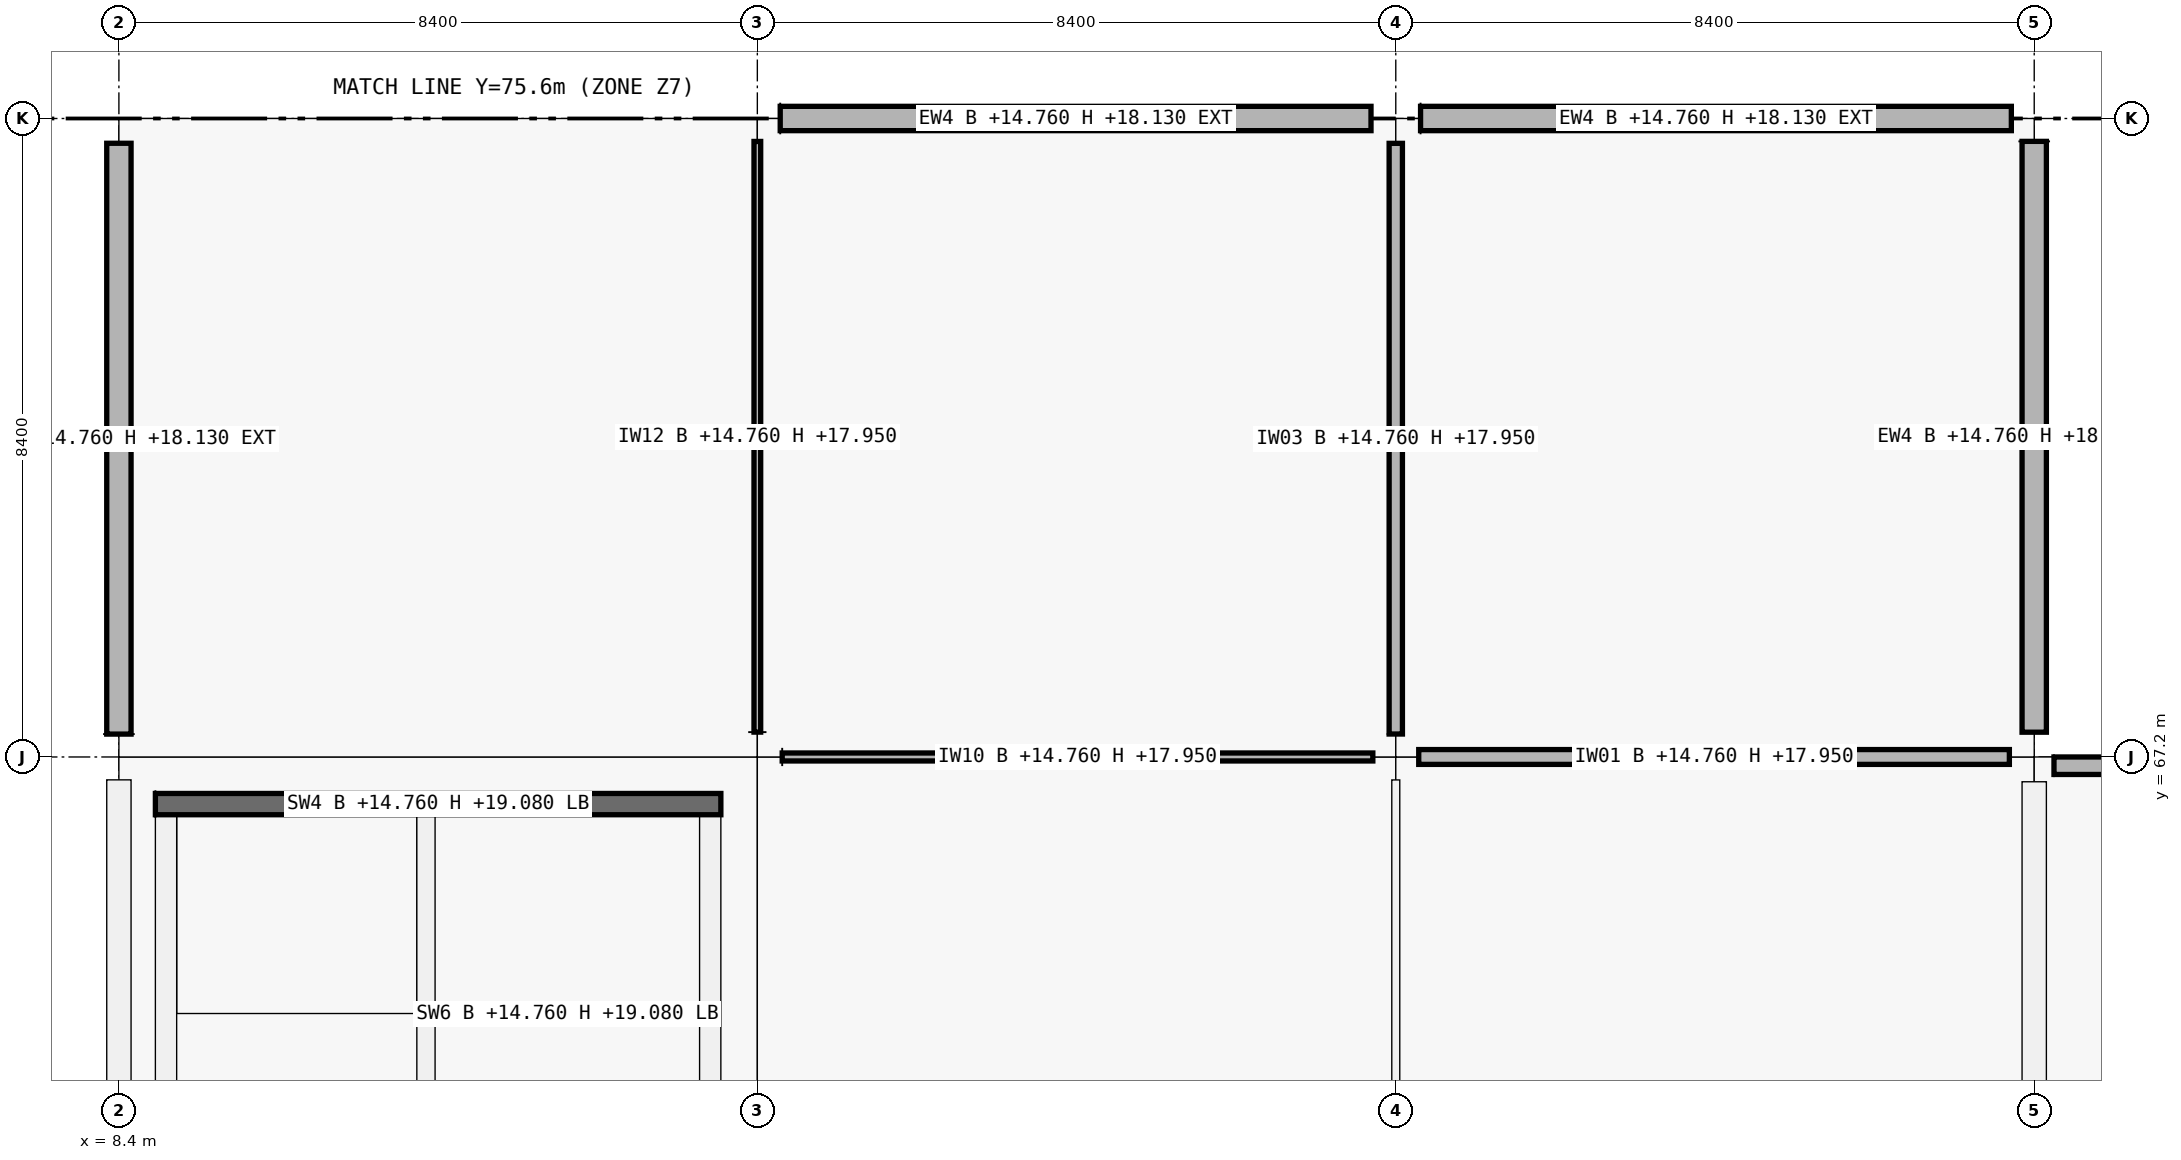
"""IFC4 building model, lengths in metres.
Left out: names, types, materials, properties, quantities, classifications, styles, units other than length and angle.
Written with IfcOpenShell. Run it as: python <this file> out.ifc"""

import sys

from ifc_helpers import new_model, si_unit, direction, frame, frame_2d, origin, origin_2d, place, context, subcontext, project, spatial, rectangle, extrude, element, fill, save


model = new_model("IFC4")
c1 = context("Model", 3, precision=1e-05, world=origin(), true_north=direction((0.0, 1.0)))
c2 = subcontext(c1, "Body", "Model", "MODEL_VIEW")
j1 = project(units=[si_unit("LENGTHUNIT", "METRE"), si_unit("PLANEANGLEUNIT", "RADIAN")], contexts=[c1])
p1 = place(None, origin())
s1 = spatial("IfcSite", under=j1, at=p1, CompositionType="ELEMENT")
p2 = place(p1, origin())
s2 = spatial("IfcBuilding", under=s1, at=p2, CompositionType="ELEMENT")
p3 = place(p2, frame((0.0, 0.0, 14.76)))
s3 = spatial("IfcBuildingStorey", under=s2, at=p3, CompositionType="ELEMENT", Elevation=14.76)
p4 = place(p3, frame((8.4, 67.2, 0.0), z_axis=(0.0, 0.0, 1.0), x_axis=(1.0, 0.0, 0.0)))
e1 = element("IfcColumn", 1, at=p4, inside=s3, PredefinedType="COLUMN", context=c2, shape_type="SweptSolid", body=[
    extrude(rectangle(XDim=0.6, YDim=0.6, at=origin_2d()), origin(), (0.0, 0.0, 1.0), 4.32),
])
for number, where, z_axis, x_axis in (
    (2, (8.4, 75.6, 0.0), (0.0, 0.0, 1.0), (1.0, 0.0, 0.0)),
    (3, (16.8, 67.2, 0.0), (0.0, 0.0, 1.0), (1.0, 0.0, 0.0)),
):
    element("IfcColumn", number, at=place(p3, frame(where, z_axis=z_axis, x_axis=x_axis)), inside=s3, PredefinedType="COLUMN", context=c2, shape_type="SweptSolid", body=[
        extrude(rectangle(XDim=0.65, YDim=0.65, at=origin_2d()), origin(), (0.0, 0.0, 1.0), 4.32),
    ])
for number, where, z_axis, x_axis in (
    (4, (16.8, 75.6, 0.0), (0.0, 0.0, 1.0), (1.0, 0.0, 0.0)),
    (5, (25.2, 67.2, 0.0), (0.0, 0.0, 1.0), (1.0, 0.0, 0.0)),
):
    element("IfcColumn", number, at=place(p3, frame(where, z_axis=z_axis, x_axis=x_axis)), inside=s3, PredefinedType="COLUMN", context=c2, shape_type="SweptSolid", body=[
        extrude(rectangle(XDim=0.6, YDim=0.6, at=origin_2d()), origin(), (0.0, 0.0, 1.0), 4.32),
    ])
for number, where, z_axis, x_axis in (
    (6, (25.2, 75.6, 0.0), (0.0, 0.0, 1.0), (1.0, 0.0, 0.0)),
    (7, (33.6, 67.2, 0.0), (0.0, 0.0, 1.0), (1.0, 0.0, 0.0)),
):
    element("IfcColumn", number, at=place(p3, frame(where, z_axis=z_axis, x_axis=x_axis)), inside=s3, PredefinedType="COLUMN", context=c2, shape_type="SweptSolid", body=[
        extrude(rectangle(XDim=0.65, YDim=0.65, at=origin_2d()), origin(), (0.0, 0.0, 1.0), 4.32),
    ])
p5 = place(p3, frame((33.6, 75.6, 0.0), z_axis=(0.0, 0.0, 1.0), x_axis=(1.0, 0.0, 0.0)))
e8 = element("IfcColumn", 8, at=p5, inside=s3, PredefinedType="COLUMN", context=c2, shape_type="SweptSolid", body=[
    extrude(rectangle(XDim=0.6, YDim=0.6, at=origin_2d()), origin(), (0.0, 0.0, 1.0), 4.32),
])
p6 = place(p3, frame((8.4, 59.126, 0.0), z_axis=(0.0, 0.0, 1.0), x_axis=(0.0, 1.0, 0.0)))
e9 = element("IfcWall", 9, at=p6, inside=s3, PredefinedType="SOLIDWALL", context=c2, shape_type="SweptSolid", body=[
    extrude(rectangle(XDim=7.773, YDim=0.32, at=frame_2d((3.886, 0.0))), origin(), (0.0, 0.0, 1.0), 3.37),
])
p7 = place(p3, frame((8.4, 67.501, 0.0), z_axis=(0.0, 0.0, 1.0), x_axis=(0.0, 1.0, 0.0)))
e10 = element("IfcWall", 10, at=p7, inside=s3, PredefinedType="SOLIDWALL", context=c2, shape_type="SweptSolid", body=[
    extrude(rectangle(XDim=7.773, YDim=0.32, at=frame_2d((3.886, 0.0))), origin(), (0.0, 0.0, 1.0), 3.37),
])
p8 = place(p7, frame((2.786, 0.0, 0.9)))
e11 = element("IfcOpeningElement", 11, at=p8, cuts=e10, PredefinedType="OPENING", context=c2, shape_type="SweptSolid", body=[
    extrude(rectangle(XDim=2.2, YDim=1.35, at=frame_2d((1.1, 0.675))), frame((0.0, 0.16, 0.0), z_axis=(0.0, -1.0, 0.0), x_axis=(1.0, 0.0, 0.0)), (0.0, 0.0, 1.0), 0.32),
])
p9 = place(p3, frame((17.101, 75.6, 0.0), z_axis=(0.0, 0.0, 1.0), x_axis=(1.0, 0.0, 0.0)))
e12 = element("IfcWall", 12, at=p9, inside=s3, PredefinedType="SOLIDWALL", context=c2, shape_type="SweptSolid", body=[
    extrude(rectangle(XDim=7.773, YDim=0.32, at=frame_2d((3.886, 0.0))), origin(), (0.0, 0.0, 1.0), 3.37),
])
p10 = place(p9, frame((2.986, 0.0, 0.9)))
e13 = element("IfcOpeningElement", 13, at=p10, cuts=e12, PredefinedType="OPENING", context=c2, shape_type="SweptSolid", body=[
    extrude(rectangle(XDim=1.8, YDim=1.35, at=frame_2d((0.9, 0.675))), frame((0.0, 0.16, 0.0), z_axis=(0.0, -1.0, 0.0), x_axis=(1.0, 0.0, 0.0)), (0.0, 0.0, 1.0), 0.32),
])
p11 = place(p3, frame((33.6, 66.874, 0.0), z_axis=(0.0, 0.0, 1.0), x_axis=(0.0, -1.0, 0.0)))
e14 = element("IfcWall", 14, at=p11, inside=s3, PredefinedType="SOLIDWALL", context=c2, shape_type="SweptSolid", body=[
    extrude(rectangle(XDim=7.773, YDim=0.32, at=frame_2d((3.886, 0.0))), origin(), (0.0, 0.0, 1.0), 3.37),
])
p12 = place(p11, frame((2.286, 0.0, 0.9)))
e15 = element("IfcOpeningElement", 15, at=p12, cuts=e14, PredefinedType="OPENING", context=c2, shape_type="SweptSolid", body=[
    extrude(rectangle(XDim=3.2, YDim=1.75, at=frame_2d((1.6, 0.875))), frame((0.0, 0.16, 0.0), z_axis=(0.0, -1.0, 0.0), x_axis=(1.0, 0.0, 0.0)), (0.0, 0.0, 1.0), 0.32),
])
p13 = place(p3, frame((25.526, 75.6, 0.0), z_axis=(0.0, 0.0, 1.0), x_axis=(1.0, 0.0, 0.0)))
e16 = element("IfcWall", 16, at=p13, inside=s3, PredefinedType="SOLIDWALL", context=c2, shape_type="SweptSolid", body=[
    extrude(rectangle(XDim=7.773, YDim=0.32, at=frame_2d((3.887, 0.0))), origin(), (0.0, 0.0, 1.0), 3.37),
])
p14 = place(p13, frame((2.636, 0.0, 0.9)))
e17 = element("IfcOpeningElement", 17, at=p14, cuts=e16, PredefinedType="OPENING", context=c2, shape_type="SweptSolid", body=[
    extrude(rectangle(XDim=2.5, YDim=1.65, at=frame_2d((1.25, 0.825))), frame((0.0, 0.16, 0.0), z_axis=(0.0, -1.0, 0.0), x_axis=(1.0, 0.0, 0.0)), (0.0, 0.0, 1.0), 0.32),
])
p15 = place(p3, frame((33.6, 75.299, 0.0), z_axis=(0.0, 0.0, 1.0), x_axis=(0.0, -1.0, 0.0)))
e18 = element("IfcWall", 18, at=p15, inside=s3, PredefinedType="SOLIDWALL", context=c2, shape_type="SweptSolid", body=[
    extrude(rectangle(XDim=7.773, YDim=0.32, at=frame_2d((3.887, 0.0))), origin(), (0.0, 0.0, 1.0), 3.37),
])
p16 = place(p3, frame((33.86, 67.085, 0.0), z_axis=(0.0, 0.0, 1.0), x_axis=(1.0, 0.0, 0.0)))
e19 = element("IfcWall", 19, at=p16, inside=s3, PredefinedType="PARAPET", context=c2, shape_type="SweptSolid", body=[
    extrude(rectangle(XDim=7.88, YDim=0.23, at=frame_2d((3.94, 0.0))), origin(), (0.0, 0.0, 1.0), 0.95),
])
p17 = place(p3, frame((9.02, 59.56, 0.0), z_axis=(0.0, 0.0, 1.0), x_axis=(0.0, 1.0, 0.0)))
e20 = element("IfcWall", 20, at=p17, inside=s3, PredefinedType="SHEAR", context=c2, shape_type="SweptSolid", body=[
    extrude(rectangle(XDim=6.88, YDim=0.28, at=frame_2d((3.44, 0.0))), origin(), (0.0, 0.0, 1.0), 4.32),
])
p18 = place(p3, frame((8.88, 66.58, 0.0), z_axis=(0.0, 0.0, 1.0), x_axis=(1.0, 0.0, 0.0)))
e21 = element("IfcWall", 21, at=p18, inside=s3, PredefinedType="SHEAR", context=c2, shape_type="SweptSolid", body=[
    extrude(rectangle(XDim=7.44, YDim=0.28, at=frame_2d((3.72, 0.0))), origin(), (0.0, 0.0, 1.0), 4.32),
])
p19 = place(p3, frame((16.18, 66.44, 0.0), z_axis=(0.0, 0.0, 1.0), x_axis=(0.0, -1.0, 0.0)))
e22 = element("IfcWall", 22, at=p19, inside=s3, PredefinedType="SHEAR", context=c2, shape_type="SweptSolid", body=[
    extrude(rectangle(XDim=6.88, YDim=0.28, at=frame_2d((3.44, 0.0))), origin(), (0.0, 0.0, 1.0), 4.32),
])
p20 = place(p3, frame((12.44, 59.56, 0.0), z_axis=(0.0, 0.0, 1.0), x_axis=(0.0, 1.0, 0.0)))
e23 = element("IfcWall", 23, at=p20, inside=s3, PredefinedType="SHEAR", context=c2, shape_type="SweptSolid", body=[
    extrude(rectangle(XDim=6.88, YDim=0.24, at=frame_2d((3.44, 0.0))), origin(), (0.0, 0.0, 1.0), 4.32),
])
p21 = place(p20, frame((0.12, 0.0, 0.0)))
e24 = element("IfcOpeningElement", 24, at=p21, cuts=e23, PredefinedType="OPENING", context=c2, shape_type="SweptSolid", body=[
    extrude(rectangle(XDim=1.0, YDim=2.15, at=frame_2d((0.5, 1.075))), frame((0.0, 0.12, 0.0), z_axis=(0.0, -1.0, 0.0), x_axis=(1.0, 0.0, 0.0)), (0.0, 0.0, 1.0), 0.24),
])
p22 = place(p3, frame((12.56, 63.82, 0.0), z_axis=(0.0, 0.0, 1.0), x_axis=(1.0, 0.0, 0.0)))
e25 = element("IfcWall", 25, at=p22, inside=s3, PredefinedType="SHEAR", context=c2, shape_type="SweptSolid", body=[
    extrude(rectangle(XDim=3.48, YDim=0.24, at=frame_2d((1.74, 0.0))), origin(), (0.0, 0.0, 1.0), 4.32),
])
p23 = place(p22, frame((1.19, 0.0, 0.0)))
e26 = element("IfcOpeningElement", 26, at=p23, cuts=e25, PredefinedType="OPENING", context=c2, shape_type="SweptSolid", body=[
    extrude(rectangle(XDim=1.1, YDim=2.15, at=frame_2d((0.55, 1.075))), frame((0.0, 0.12, 0.0), z_axis=(0.0, -1.0, 0.0), x_axis=(1.0, 0.0, 0.0)), (0.0, 0.0, 1.0), 0.24),
])
p24 = place(p3, frame((17.127, 67.2, 0.0), z_axis=(0.0, 0.0, 1.0), x_axis=(1.0, 0.0, 0.0)))
e27 = element("IfcWall", 27, at=p24, inside=s3, PredefinedType="PARTITIONING", context=c2, shape_type="SweptSolid", body=[
    extrude(rectangle(XDim=7.771, YDim=0.105, at=frame_2d((3.885, 0.0))), origin(), (0.0, 0.0, 1.0), 3.19),
])
p25 = place(p24, frame((3.356, 0.0, 0.0)))
e28 = element("IfcOpeningElement", 28, at=p25, cuts=e27, PredefinedType="OPENING", context=c2, shape_type="SweptSolid", body=[
    extrude(rectangle(XDim=1.06, YDim=2.25, at=frame_2d((0.53, 1.125))), frame((0.0, 0.052, 0.0), z_axis=(0.0, -1.0, 0.0), x_axis=(1.0, 0.0, 0.0)), (0.0, 0.0, 1.0), 0.105),
])
p26 = place(p3, frame((25.502, 67.2, 0.0), z_axis=(0.0, 0.0, 1.0), x_axis=(1.0, 0.0, 0.0)))
e29 = element("IfcWall", 29, at=p26, inside=s3, PredefinedType="PARTITIONING", context=c2, shape_type="SweptSolid", body=[
    extrude(rectangle(XDim=7.771, YDim=0.195, at=frame_2d((3.885, 0.0))), origin(), (0.0, 0.0, 1.0), 3.19),
])
p27 = place(p26, frame((3.401, 0.0, 0.0)))
e30 = element("IfcOpeningElement", 30, at=p27, cuts=e29, PredefinedType="OPENING", context=c2, shape_type="SweptSolid", body=[
    extrude(rectangle(XDim=0.97, YDim=2.12, at=frame_2d((0.485, 1.06))), frame((0.0, 0.098, 0.0), z_axis=(0.0, -1.0, 0.0), x_axis=(1.0, 0.0, 0.0)), (0.0, 0.0, 1.0), 0.195),
])
p28 = place(p3, frame((16.8, 67.527, 0.0), z_axis=(0.0, 0.0, 1.0), x_axis=(0.0, 1.0, 0.0)))
e31 = element("IfcWall", 31, at=p28, inside=s3, PredefinedType="PARTITIONING", context=c2, shape_type="SweptSolid", body=[
    extrude(rectangle(XDim=7.771, YDim=0.088, at=frame_2d((3.885, 0.0))), origin(), (0.0, 0.0, 1.0), 3.19),
])
p29 = place(p28, frame((3.356, 0.0, 0.0)))
e32 = element("IfcOpeningElement", 32, at=p29, cuts=e31, PredefinedType="OPENING", context=c2, shape_type="SweptSolid", body=[
    extrude(rectangle(XDim=1.06, YDim=2.25, at=frame_2d((0.53, 1.125))), frame((0.0, 0.044, 0.0), z_axis=(0.0, -1.0, 0.0), x_axis=(1.0, 0.0, 0.0)), (0.0, 0.0, 1.0), 0.088),
])
p30 = place(p3, frame((25.2, 59.127, 0.0), z_axis=(0.0, 0.0, 1.0), x_axis=(0.0, 1.0, 0.0)))
e33 = element("IfcWall", 33, at=p30, inside=s3, PredefinedType="PARTITIONING", context=c2, shape_type="SweptSolid", body=[
    extrude(rectangle(XDim=7.771, YDim=0.105, at=frame_2d((3.885, 0.0))), origin(), (0.0, 0.0, 1.0), 3.19),
])
p31 = place(p30, frame((3.396, 0.0, 0.0)))
e34 = element("IfcOpeningElement", 34, at=p31, cuts=e33, PredefinedType="OPENING", context=c2, shape_type="SweptSolid", body=[
    extrude(rectangle(XDim=0.98, YDim=2.18, at=frame_2d((0.49, 1.09))), frame((0.0, 0.052, 0.0), z_axis=(0.0, -1.0, 0.0), x_axis=(1.0, 0.0, 0.0)), (0.0, 0.0, 1.0), 0.105),
])
p32 = place(p3, frame((25.2, 67.502, 0.0), z_axis=(0.0, 0.0, 1.0), x_axis=(0.0, 1.0, 0.0)))
e35 = element("IfcWall", 35, at=p32, inside=s3, PredefinedType="PARTITIONING", context=c2, shape_type="SweptSolid", body=[
    extrude(rectangle(XDim=7.771, YDim=0.175, at=frame_2d((3.885, 0.0))), origin(), (0.0, 0.0, 1.0), 3.19),
])
p33 = place(p32, frame((3.356, 0.0, 0.0)))
e36 = element("IfcOpeningElement", 36, at=p33, cuts=e35, PredefinedType="OPENING", context=c2, shape_type="SweptSolid", body=[
    extrude(rectangle(XDim=1.06, YDim=2.25, at=frame_2d((0.53, 1.125))), frame((0.0, 0.087, 0.0), z_axis=(0.0, -1.0, 0.0), x_axis=(1.0, 0.0, 0.0)), (0.0, 0.0, 1.0), 0.175),
])
p34 = place(p8, origin())
e37 = element("IfcWindow", 37, at=p34, inside=s3, PartitioningType="SINGLE_PANEL", PredefinedType="WINDOW", context=c2, shape_type="SweptSolid", body=[
    extrude(rectangle(XDim=2.2, YDim=1.35, at=frame_2d((1.1, 0.675))), frame((0.0, 0.03, 0.0), z_axis=(0.0, -1.0, 0.0), x_axis=(1.0, 0.0, 0.0)), (0.0, 0.0, 1.0), 0.06),
])
fill(e11, e37)
p35 = place(p10, origin())
e38 = element("IfcWindow", 38, at=p35, inside=s3, PartitioningType="SINGLE_PANEL", PredefinedType="WINDOW", context=c2, shape_type="SweptSolid", body=[
    extrude(rectangle(XDim=1.8, YDim=1.35, at=frame_2d((0.9, 0.675))), frame((0.0, 0.03, 0.0), z_axis=(0.0, -1.0, 0.0), x_axis=(1.0, 0.0, 0.0)), (0.0, 0.0, 1.0), 0.06),
])
fill(e13, e38)
p36 = place(p12, origin())
e39 = element("IfcWindow", 39, at=p36, inside=s3, PartitioningType="SINGLE_PANEL", PredefinedType="WINDOW", context=c2, shape_type="SweptSolid", body=[
    extrude(rectangle(XDim=3.2, YDim=1.75, at=frame_2d((1.6, 0.875))), frame((0.0, 0.03, 0.0), z_axis=(0.0, -1.0, 0.0), x_axis=(1.0, 0.0, 0.0)), (0.0, 0.0, 1.0), 0.06),
])
fill(e15, e39)
p37 = place(p14, origin())
e40 = element("IfcWindow", 40, at=p37, inside=s3, PartitioningType="SINGLE_PANEL", PredefinedType="WINDOW", context=c2, shape_type="SweptSolid", body=[
    extrude(rectangle(XDim=2.5, YDim=1.65, at=frame_2d((1.25, 0.825))), frame((0.0, 0.03, 0.0), z_axis=(0.0, -1.0, 0.0), x_axis=(1.0, 0.0, 0.0)), (0.0, 0.0, 1.0), 0.06),
])
fill(e17, e40)
p38 = place(p23, origin())
e41 = element("IfcDoor", 41, at=p38, inside=s3, OperationType="DOUBLE_DOOR_SLIDING", PredefinedType="DOOR", context=c2, shape_type="SweptSolid", body=[
    extrude(rectangle(XDim=1.1, YDim=2.15, at=frame_2d((0.55, 1.075))), frame((0.0, 0.025, 0.0), z_axis=(0.0, -1.0, 0.0), x_axis=(1.0, 0.0, 0.0)), (0.0, 0.0, 1.0), 0.05),
])
fill(e26, e41)
p39 = place(p25, origin())
e42 = element("IfcDoor", 42, at=p39, inside=s3, OperationType="SINGLE_SWING_LEFT", PredefinedType="DOOR", context=c2, shape_type="SweptSolid", body=[
    extrude(rectangle(XDim=1.06, YDim=2.25, at=frame_2d((0.53, 1.125))), frame((0.0, 0.025, 0.0), z_axis=(0.0, -1.0, 0.0), x_axis=(1.0, 0.0, 0.0)), (0.0, 0.0, 1.0), 0.05),
])
fill(e28, e42)
p40 = place(p31, origin())
e43 = element("IfcDoor", 43, at=p40, inside=s3, OperationType="SINGLE_SWING_RIGHT", PredefinedType="DOOR", context=c2, shape_type="SweptSolid", body=[
    extrude(rectangle(XDim=0.98, YDim=2.18, at=frame_2d((0.49, 1.09))), frame((0.0, 0.025, 0.0), z_axis=(0.0, -1.0, 0.0), x_axis=(1.0, 0.0, 0.0)), (0.0, 0.0, 1.0), 0.05),
])
fill(e34, e43)
p41 = place(p27, origin())
e44 = element("IfcDoor", 44, at=p41, inside=s3, OperationType="SINGLE_SWING_RIGHT", PredefinedType="DOOR", context=c2, shape_type="SweptSolid", body=[
    extrude(rectangle(XDim=0.97, YDim=2.12, at=frame_2d((0.485, 1.06))), frame((0.0, 0.025, 0.0), z_axis=(0.0, -1.0, 0.0), x_axis=(1.0, 0.0, 0.0)), (0.0, 0.0, 1.0), 0.05),
])
fill(e30, e44)
p42 = place(p29, origin())
e45 = element("IfcDoor", 45, at=p42, inside=s3, OperationType="SINGLE_SWING_LEFT", PredefinedType="DOOR", context=c2, shape_type="SweptSolid", body=[
    extrude(rectangle(XDim=1.06, YDim=2.25, at=frame_2d((0.53, 1.125))), frame((0.0, 0.025, 0.0), z_axis=(0.0, -1.0, 0.0), x_axis=(1.0, 0.0, 0.0)), (0.0, 0.0, 1.0), 0.05),
])
fill(e32, e45)
p43 = place(p33, origin())
e46 = element("IfcDoor", 46, at=p43, inside=s3, OperationType="SINGLE_SWING_RIGHT", PredefinedType="DOOR", context=c2, shape_type="SweptSolid", body=[
    extrude(rectangle(XDim=1.06, YDim=2.25, at=frame_2d((0.53, 1.125))), frame((0.0, 0.025, 0.0), z_axis=(0.0, -1.0, 0.0), x_axis=(1.0, 0.0, 0.0)), (0.0, 0.0, 1.0), 0.05),
])
fill(e36, e46)
save(model, sys.argv[1])
